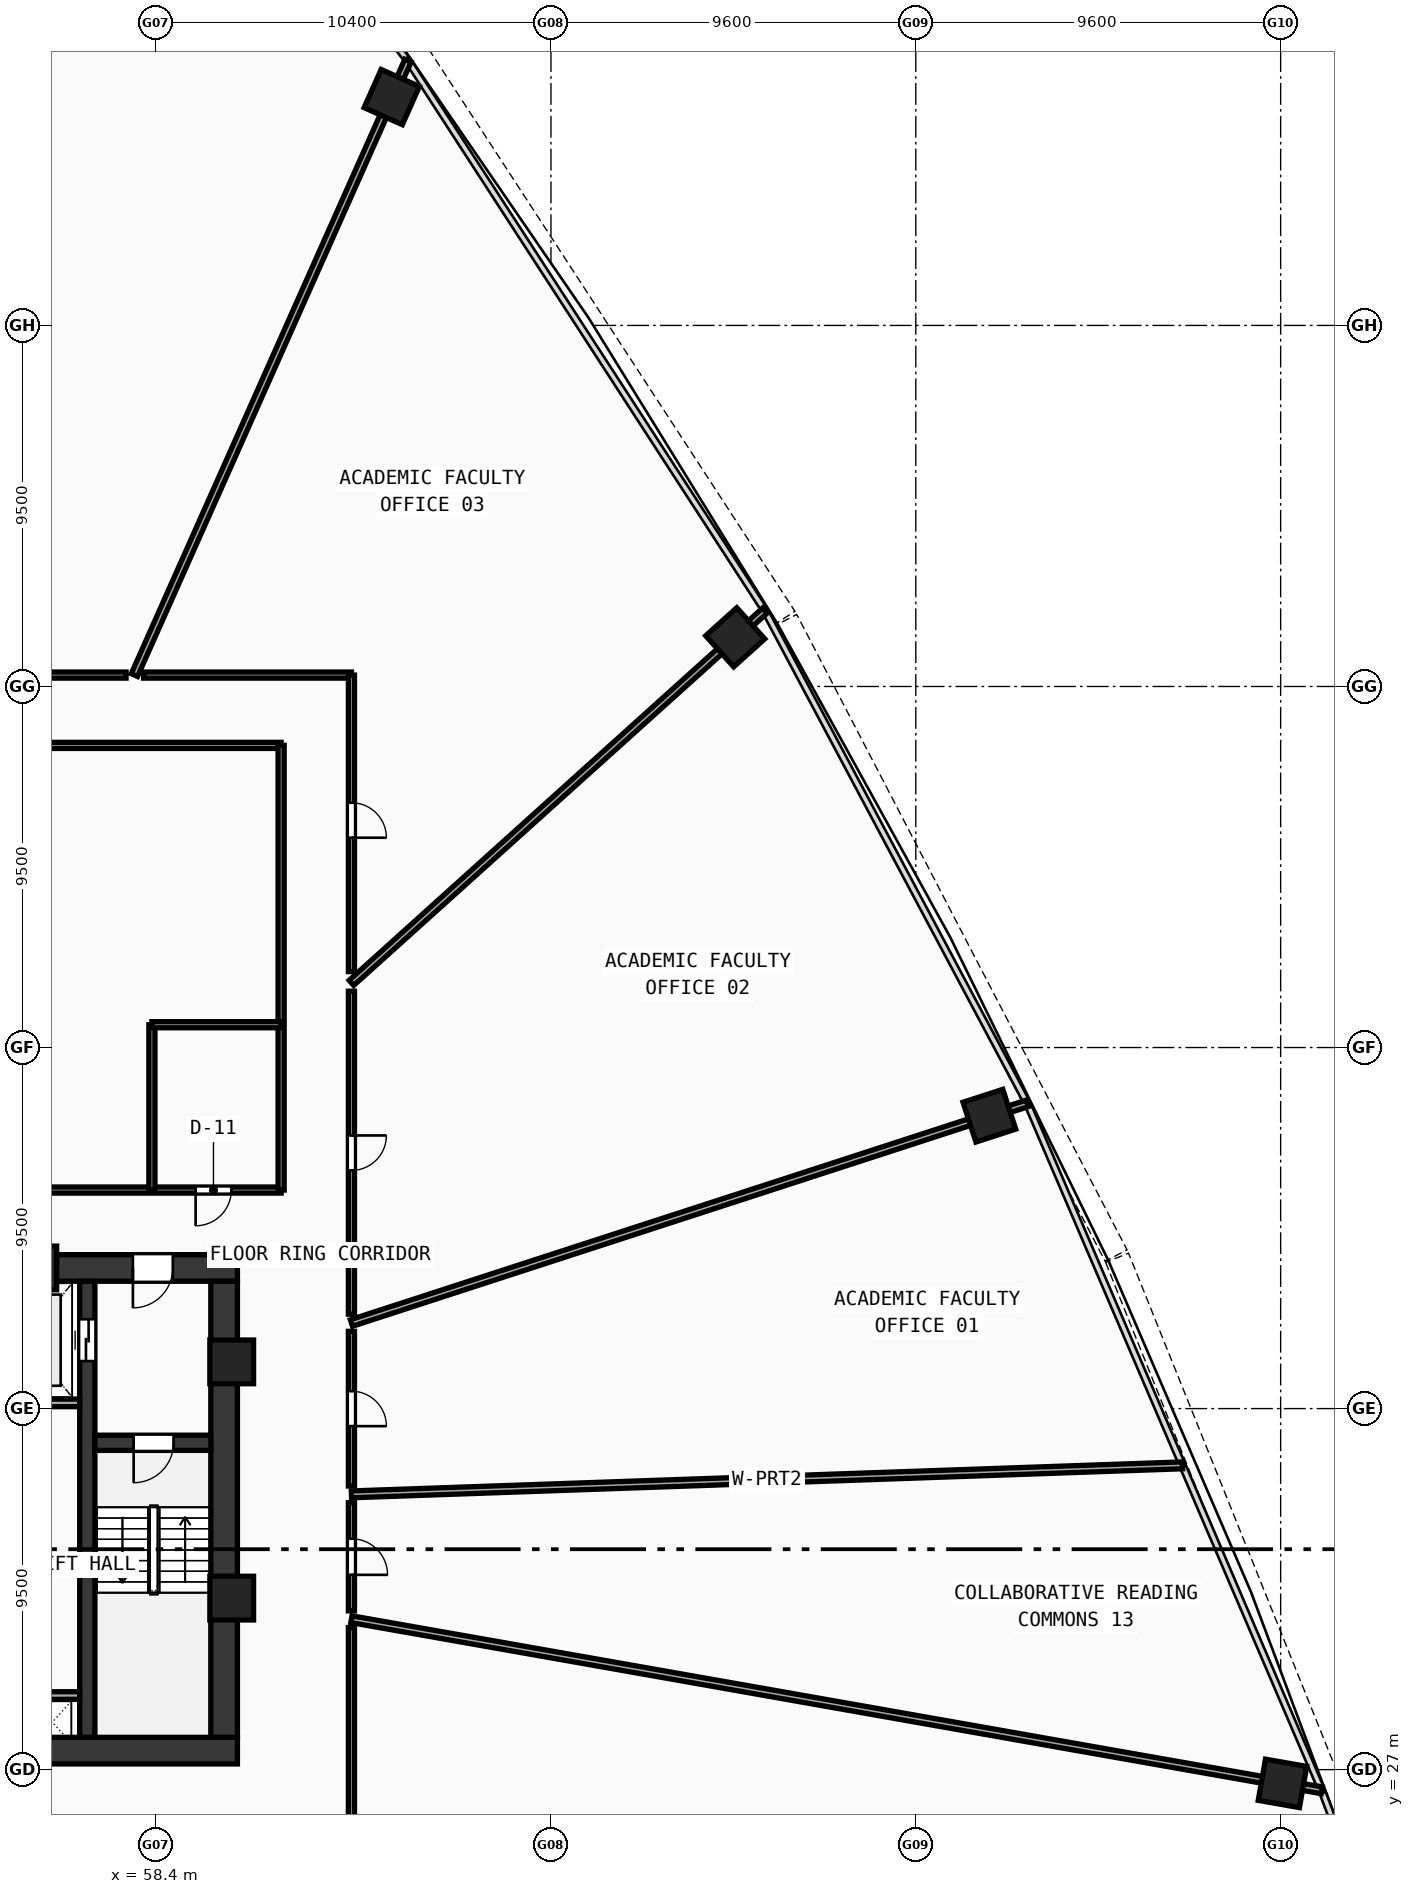
"""IFC4 building model, lengths in metres.
Left out: names, types, materials, properties, quantities, classifications, styles, units other than length and angle.
Written with IfcOpenShell. Run it as: python <this file> out.ifc"""

import sys

from ifc_helpers import new_model, si_unit, direction, frame, frame_2d, origin, origin_with_axes, origin_2d, place, context, subcontext, project, spatial, rectangle, hollow_rectangle, extrude, source, transform, mapped, element, fill, save


model = new_model("IFC4")
c1 = context("Model", 3, precision=1e-05, world=origin(), true_north=direction((0.0, 1.0)))
c2 = subcontext(c1, "Body", "Model", "MODEL_VIEW")
j1 = project(units=[si_unit("LENGTHUNIT", "METRE"), si_unit("PLANEANGLEUNIT", "RADIAN")], contexts=[c1])
p1 = place(None, origin())
s1 = spatial("IfcSite", under=j1, at=p1, CompositionType="ELEMENT")
p2 = place(p1, origin())
s2 = spatial("IfcBuilding", under=s1, at=p2, CompositionType="ELEMENT")
p3 = place(p2, frame((0.0, 0.0, 70.33)))
s3 = spatial("IfcBuildingStorey", under=s2, at=p3, CompositionType="ELEMENT", Elevation=70.33)
p4 = place(p3, frame((35.45, 27.5, 0.0), z_axis=(0.0, 0.0, 1.0), x_axis=(1.0, 0.0, 0.0)))
e1 = element("IfcWall", 1, at=p4, inside=s3, PredefinedType="SHEAR", context=c2, shape_type="SweptSolid", body=[
    extrude(rectangle(XDim=25.1, YDim=0.7, at=frame_2d((12.55, 0.0))), origin(), (0.0, 0.0, 1.0), 5.77),
])
p5 = place(p3, frame((49.2, 40.2, 0.0), z_axis=(0.0, 0.0, 1.0), x_axis=(1.0, 0.0, 0.0)))
e2 = element("IfcWall", 2, at=p5, inside=s3, PredefinedType="SHEAR", context=c2, shape_type="SweptSolid", body=[
    extrude(rectangle(XDim=11.35, YDim=0.7, at=frame_2d((5.675, 0.0))), origin(), (0.0, 0.0, 1.0), 5.77),
])
p6 = place(p5, frame((8.6, 0.0, 0.0)))
e3 = element("IfcOpeningElement", 3, at=p6, cuts=e2, PredefinedType="OPENING", context=c2, shape_type="SweptSolid", body=[
    extrude(rectangle(XDim=1.05, YDim=2.1, at=frame_2d((0.525, 1.05))), frame((0.0, 0.36, 0.0), z_axis=(0.0, -1.0, 0.0), x_axis=(1.0, 0.0, 0.0)), (0.0, 0.0, 1.0), 0.72),
])
p7 = place(p3, frame((60.2, 27.85, 0.0), z_axis=(0.0, 0.0, 1.0), x_axis=(0.0, 1.0, 0.0)))
e4 = element("IfcWall", 4, at=p7, inside=s3, PredefinedType="SHEAR", context=c2, shape_type="SweptSolid", body=[
    extrude(rectangle(XDim=12.0, YDim=0.7, at=frame_2d((6.0, 0.0))), origin(), (0.0, 0.0, 1.0), 5.77),
])
p8 = place(p3, frame((56.6, 27.85, 0.0), z_axis=(0.0, 0.0, 1.0), x_axis=(0.0, 1.0, 0.0)))
e5 = element("IfcWall", 5, at=p8, inside=s3, PredefinedType="SHEAR", context=c2, shape_type="SweptSolid", body=[
    extrude(rectangle(XDim=12.0, YDim=0.4, at=frame_2d((6.0, 0.0))), origin(), (0.0, 0.0, 1.0), 5.77),
])
p9 = place(p8, frame((9.9, 0.0, 0.0)))
e6 = element("IfcOpeningElement", 6, at=p9, cuts=e5, PredefinedType="OPENING", context=c2, shape_type="SweptSolid", body=[
    extrude(rectangle(XDim=1.1, YDim=2.1, at=frame_2d((0.55, 1.05))), frame((0.0, 0.21, 0.0), z_axis=(0.0, -1.0, 0.0), x_axis=(1.0, 0.0, 0.0)), (0.0, 0.0, 1.0), 0.42),
])
p10 = place(p3, frame((56.8, 35.6, 0.0), z_axis=(0.0, 0.0, 1.0), x_axis=(1.0, 0.0, 0.0)))
e7 = element("IfcWall", 7, at=p10, inside=s3, PredefinedType="SHEAR", context=c2, shape_type="SweptSolid", body=[
    extrude(rectangle(XDim=3.05, YDim=0.4, at=frame_2d((1.525, 0.0))), origin(), (0.0, 0.0, 1.0), 5.77),
])
p11 = place(p10, frame((1.02, 0.0, 0.0)))
e8 = element("IfcOpeningElement", 8, at=p11, cuts=e7, PredefinedType="OPENING", context=c2, shape_type="SweptSolid", body=[
    extrude(rectangle(XDim=1.05, YDim=2.1, at=frame_2d((0.525, 1.05))), frame((0.0, 0.21, 0.0), z_axis=(0.0, -1.0, 0.0), x_axis=(1.0, 0.0, 0.0)), (0.0, 0.0, 1.0), 0.42),
])
m1 = source(origin(), c2, "Body", "SweptSolid", [
    extrude(hollow_rectangle(XDim=1.15, YDim=1.15, WallThickness=0.048, at=origin_2d()), origin(), (0.0, 0.0, 1.0), 6.03),
])
for number, where, z_axis, x_axis in (
    (9, (60.4, 31.513, -0.26), (0.0, 0.0, 1.0), (1.0, 0.0, 0.0)),
    (10, (60.4, 37.729, -0.26), (0.0, 0.0, 1.0), (1.0, 0.0, 0.0)),
    (11, (55.219, 40.2, -0.26), (0.0, 0.0, 1.0), (1.0, 0.0, 0.0)),
):
    element("IfcColumn", number, at=place(p3, frame(where, z_axis=z_axis, x_axis=x_axis)), inside=s3, PredefinedType="COLUMN", context=c2, shape_type="MappedRepresentation", body=[
        mapped(m1, transform((0.0, 0.0, 0.0), scale=1.0)),
    ])
m2 = source(origin(), c2, "Body", "SweptSolid", [
    extrude(hollow_rectangle(XDim=1.1, YDim=1.1, WallThickness=0.045, at=origin_2d()), origin(), (0.0, 0.0, 1.0), 6.03),
])
for number, where, z_axis, x_axis in (
    (12, (88.048, 26.638, -0.26), (0.0, 0.0, 1.0), (0.174, 0.985, 0.0)),
    (13, (80.335, 44.206, -0.26), (0.0, 0.0, 1.0), (-0.309, 0.951, 0.0)),
    (14, (73.649, 56.794, -0.26), (0.0, 0.0, 1.0), (-0.669, 0.743, 0.0)),
    (15, (64.611, 71.009, -0.26), (0.0, 0.0, 1.0), (-0.914, 0.407, 0.0)),
):
    element("IfcColumn", number, at=place(p3, frame(where, z_axis=z_axis, x_axis=x_axis)), inside=s3, PredefinedType="COLUMN", context=c2, shape_type="MappedRepresentation", body=[
        mapped(m2, transform((0.0, 0.0, 0.0), scale=1.0)),
    ])
p12 = place(p3, frame((53.68, 36.65, 0.0), z_axis=(0.0, 0.0, 1.0), x_axis=(1.0, 0.0, 0.0)))
e16 = element("IfcWall", 16, at=p12, inside=s3, PredefinedType="SOLIDWALL", context=c2, shape_type="SweptSolid", body=[
    extrude(rectangle(XDim=2.72, YDim=0.2, at=frame_2d((1.36, 0.0))), origin(), (0.0, 0.0, 1.0), 5.77),
])
p13 = place(p3, frame((55.12, 28.95, 0.0), z_axis=(0.0, 0.0, 1.0), x_axis=(1.0, 0.0, 0.0)))
e17 = element("IfcWall", 17, at=p13, inside=s3, PredefinedType="SOLIDWALL", context=c2, shape_type="SweptSolid", body=[
    extrude(rectangle(XDim=1.28, YDim=0.2, at=frame_2d((0.64, 0.0))), origin(), (0.0, 0.0, 1.0), 5.77),
])
p14 = place(p3, frame((45.92, 42.25, 0.0), z_axis=(0.0, 0.0, 1.0), x_axis=(1.0, 0.0, 0.0)))
e18 = element("IfcWall", 18, at=p14, inside=s3, PredefinedType="PARTITIONING", context=c2, shape_type="SweptSolid", body=[
    extrude(rectangle(XDim=15.78, YDim=0.16, at=frame_2d((7.89, 0.0))), origin(), (0.0, 0.0, 1.0), 2.42),
])
p15 = place(p14, frame((2.1, 0.0, 0.0)))
e19 = element("IfcOpeningElement", 19, at=p15, cuts=e18, PredefinedType="OPENING", context=c2, shape_type="SweptSolid", body=[
    extrude(rectangle(XDim=0.92, YDim=2.1, at=frame_2d((0.46, 1.05))), frame((0.0, 0.09, 0.0), z_axis=(0.0, -1.0, 0.0), x_axis=(1.0, 0.0, 0.0)), (0.0, 0.0, 1.0), 0.18),
])
p16 = place(p14, frame((13.53, 0.0, 0.0)))
e20 = element("IfcOpeningElement", 20, at=p16, cuts=e18, PredefinedType="OPENING", context=c2, shape_type="SweptSolid", body=[
    extrude(rectangle(XDim=0.94, YDim=2.1, at=frame_2d((0.47, 1.05))), frame((0.0, 0.09, 0.0), z_axis=(0.0, -1.0, 0.0), x_axis=(1.0, 0.0, 0.0)), (0.0, 0.0, 1.0), 0.18),
])
p17 = place(p3, frame((45.92, 53.95, 0.0), z_axis=(0.0, 0.0, 1.0), x_axis=(1.0, 0.0, 0.0)))
e21 = element("IfcWall", 21, at=p17, inside=s3, PredefinedType="PARTITIONING", context=c2, shape_type="SweptSolid", body=[
    extrude(rectangle(XDim=15.78, YDim=0.16, at=frame_2d((7.89, 0.0))), origin(), (0.0, 0.0, 1.0), 2.42),
])
p18 = place(p3, frame((61.7, 42.25, 0.0), z_axis=(0.0, 0.0, 1.0), x_axis=(0.0, 1.0, 0.0)))
e22 = element("IfcWall", 22, at=p18, inside=s3, PredefinedType="PARTITIONING", context=c2, shape_type="SweptSolid", body=[
    extrude(rectangle(XDim=11.7, YDim=0.16, at=frame_2d((5.85, 0.0))), origin(), (0.0, 0.0, 1.0), 2.42),
])
p19 = place(p3, frame((58.3, 42.25, 0.0), z_axis=(0.0, 0.0, 1.0), x_axis=(0.0, 1.0, 0.0)))
e23 = element("IfcWall", 23, at=p19, inside=s3, PredefinedType="PARTITIONING", context=c2, shape_type="SweptSolid", body=[
    extrude(rectangle(XDim=4.35, YDim=0.16, at=frame_2d((2.175, 0.0))), origin(), (0.0, 0.0, 1.0), 2.42),
])
p20 = place(p3, frame((58.3, 46.6, 0.0), z_axis=(0.0, 0.0, 1.0), x_axis=(1.0, 0.0, 0.0)))
e24 = element("IfcWall", 24, at=p20, inside=s3, PredefinedType="PARTITIONING", context=c2, shape_type="SweptSolid", body=[
    extrude(rectangle(XDim=3.4, YDim=0.16, at=frame_2d((1.7, 0.0))), origin(), (0.0, 0.0, 1.0), 2.42),
])
p21 = place(p3, frame((63.55, 34.243, 0.0), z_axis=(0.0, 0.0, 1.0), x_axis=(0.999390701976, 0.034903077271, 0.0)))
e25 = element("IfcWall", 25, at=p21, inside=s3, PredefinedType="PARTITIONING", context=c2, shape_type="SweptSolid", body=[
    extrude(rectangle(XDim=21.88, YDim=0.18, at=frame_2d((10.94, 0.0))), origin(), (0.0, 0.0, 1.0), 5.07),
])
p22 = place(p3, frame((63.55, 38.752, 0.0), z_axis=(0.0, 0.0, 1.0), x_axis=(0.951053160417, 0.309027322514, 0.0)))
e26 = element("IfcWall", 26, at=p22, inside=s3, PredefinedType="PARTITIONING", context=c2, shape_type="SweptSolid", body=[
    extrude(rectangle(XDim=18.699, YDim=0.18, at=frame_2d((9.35, 0.0))), origin(), (0.0, 0.0, 1.0), 2.42),
])
p23 = place(p3, frame((63.55, 47.701, 0.0), z_axis=(0.0, 0.0, 1.0), x_axis=(0.743144860423, 0.669130567547, 0.0)))
e27 = element("IfcWall", 27, at=p23, inside=s3, PredefinedType="PARTITIONING", context=c2, shape_type="SweptSolid", body=[
    extrude(rectangle(XDim=14.639, YDim=0.18, at=frame_2d((7.319, 0.0))), origin(), (0.0, 0.0, 1.0), 2.42),
])
p24 = place(p3, frame((57.84, 55.8, 0.0), z_axis=(0.0, 0.0, 1.0), x_axis=(0.406732277088, 0.913547401493, 0.0)))
e28 = element("IfcWall", 28, at=p24, inside=s3, PredefinedType="PARTITIONING", context=c2, shape_type="SweptSolid", body=[
    extrude(rectangle(XDim=17.698, YDim=0.18, at=frame_2d((8.849, 0.0))), origin(), (0.0, 0.0, 1.0), 2.42),
])
p25 = place(p3, frame((63.55, 30.958, 0.0), z_axis=(0.0, 0.0, 1.0), x_axis=(0.984809239356, -0.173639747982, 0.0)))
e29 = element("IfcWall", 29, at=p25, inside=s3, PredefinedType="PARTITIONING", context=c2, shape_type="SweptSolid", body=[
    extrude(rectangle(XDim=25.926, YDim=0.18, at=frame_2d((12.963, 0.0))), origin(), (0.0, 0.0, 1.0), 2.42),
])
p26 = place(p3, frame((52.391, 55.8, 0.0), z_axis=(0.0, 0.0, 1.0), x_axis=(1.0, 0.0, 0.0)))
e30 = element("IfcWall", 30, at=p26, inside=s3, PredefinedType="PARTITIONING", context=c2, shape_type="SweptSolid", body=[
    extrude(rectangle(XDim=5.229, YDim=0.16, at=frame_2d((2.614, 0.0))), origin(), (0.0, 0.0, 1.0), 2.42),
])
p27 = place(p3, frame((58.08, 55.8, 0.0), z_axis=(0.0, 0.0, 1.0), x_axis=(1.0, 0.0, 0.0)))
e31 = element("IfcWall", 31, at=p27, inside=s3, PredefinedType="PARTITIONING", context=c2, shape_type="SweptSolid", body=[
    extrude(rectangle(XDim=5.47, YDim=0.16, at=frame_2d((2.735, 0.0))), origin(), (0.0, 0.0, 1.0), 2.42),
])
p28 = place(p3, frame((63.55, 55.8, 0.0), z_axis=(0.0, 0.0, 1.0), x_axis=(0.0, -1.0, 0.0)))
e32 = element("IfcWall", 32, at=p28, inside=s3, PredefinedType="PARTITIONING", context=c2, shape_type="SweptSolid", body=[
    extrude(rectangle(XDim=7.803, YDim=0.16, at=frame_2d((3.901, 0.0))), origin(), (0.0, 0.0, 1.0), 2.42),
])
p29 = place(p28, frame((3.359, 0.0, 0.0)))
e33 = element("IfcOpeningElement", 33, at=p29, cuts=e32, PredefinedType="OPENING", context=c2, shape_type="SweptSolid", body=[
    extrude(rectangle(XDim=0.92, YDim=2.1, at=frame_2d((0.46, 1.05))), frame((0.0, 0.09, 0.0), z_axis=(0.0, -1.0, 0.0), x_axis=(1.0, 0.0, 0.0)), (0.0, 0.0, 1.0), 0.18),
])
p30 = place(p3, frame((63.55, 47.482, 0.0), z_axis=(0.0, 0.0, 1.0), x_axis=(0.0, -1.0, 0.0)))
e34 = element("IfcWall", 34, at=p30, inside=s3, PredefinedType="PARTITIONING", context=c2, shape_type="SweptSolid", body=[
    extrude(rectangle(XDim=8.498, YDim=0.16, at=frame_2d((4.249, 0.0))), origin(), (0.0, 0.0, 1.0), 2.42),
])
p31 = place(p30, frame((3.795, 0.0, 0.0)))
e35 = element("IfcOpeningElement", 35, at=p31, cuts=e34, PredefinedType="OPENING", context=c2, shape_type="SweptSolid", body=[
    extrude(rectangle(XDim=0.92, YDim=2.1, at=frame_2d((0.46, 1.05))), frame((0.0, 0.09, 0.0), z_axis=(0.0, -1.0, 0.0), x_axis=(1.0, 0.0, 0.0)), (0.0, 0.0, 1.0), 0.18),
])
p32 = place(p3, frame((63.55, 38.533, 0.0), z_axis=(0.0, 0.0, 1.0), x_axis=(0.0, -1.0, 0.0)))
e36 = element("IfcWall", 36, at=p32, inside=s3, PredefinedType="PARTITIONING", context=c2, shape_type="SweptSolid", body=[
    extrude(rectangle(XDim=4.07, YDim=0.16, at=frame_2d((2.035, 0.0))), origin(), (0.0, 0.0, 1.0), 2.42),
])
p33 = place(p32, frame((1.575, 0.0, 0.0)))
e37 = element("IfcOpeningElement", 37, at=p33, cuts=e36, PredefinedType="OPENING", context=c2, shape_type="SweptSolid", body=[
    extrude(rectangle(XDim=0.92, YDim=2.1, at=frame_2d((0.46, 1.05))), frame((0.0, 0.09, 0.0), z_axis=(0.0, -1.0, 0.0), x_axis=(1.0, 0.0, 0.0)), (0.0, 0.0, 1.0), 0.18),
])
p34 = place(p3, frame((63.55, 34.023, 0.0), z_axis=(0.0, 0.0, 1.0), x_axis=(0.0, -1.0, 0.0)))
e38 = element("IfcWall", 38, at=p34, inside=s3, PredefinedType="PARTITIONING", context=c2, shape_type="SweptSolid", body=[
    extrude(rectangle(XDim=2.845, YDim=0.16, at=frame_2d((1.423, 0.0))), origin(), (0.0, 0.0, 1.0), 2.42),
])
p35 = place(p34, frame((0.948, 0.0, 0.0)))
e39 = element("IfcOpeningElement", 39, at=p35, cuts=e38, PredefinedType="OPENING", context=c2, shape_type="SweptSolid", body=[
    extrude(rectangle(XDim=0.95, YDim=2.1, at=frame_2d((0.475, 1.05))), frame((0.0, 0.09, 0.0), z_axis=(0.0, -1.0, 0.0), x_axis=(1.0, 0.0, 0.0)), (0.0, 0.0, 1.0), 0.18),
])
p36 = place(p3, frame((63.55, 30.735, 0.0), z_axis=(0.0, 0.0, 1.0), x_axis=(0.0, -1.0, 0.0)))
e40 = element("IfcWall", 40, at=p36, inside=s3, PredefinedType="PARTITIONING", context=c2, shape_type="SweptSolid", body=[
    extrude(rectangle(XDim=5.935, YDim=0.16, at=frame_2d((2.967, 0.0))), origin(), (0.0, 0.0, 1.0), 2.42),
])
m3 = source(origin(), c2, "Body", "SweptSolid", [
    extrude(rectangle(XDim=1.05, YDim=2.1, at=frame_2d((0.525, 1.05))), frame((0.0, 0.025, 0.0), z_axis=(0.0, -1.0, 0.0), x_axis=(1.0, 0.0, 0.0)), (0.0, 0.0, 1.0), 0.05),
])
p37 = place(p11, frame((1.05, 0.0, 0.0), z_axis=(0.0, 0.0, 1.0), x_axis=(-1.0, 0.0, 0.0)))
e41 = element("IfcDoor", 41, at=p37, inside=s3, OperationType="SINGLE_SWING_RIGHT", PredefinedType="DOOR", context=c2, shape_type="MappedRepresentation", body=[
    mapped(m3, transform((0.0, 0.0, 0.0), scale=1.0)),
])
fill(e8, e41)
p38 = place(p6, frame((1.05, 0.0, 0.0), z_axis=(0.0, 0.0, 1.0), x_axis=(-1.0, 0.0, 0.0)))
e42 = element("IfcDoor", 42, at=p38, inside=s3, OperationType="SINGLE_SWING_RIGHT", PredefinedType="DOOR", context=c2, shape_type="MappedRepresentation", body=[
    mapped(m3, transform((0.0, 0.0, 0.0), scale=1.0)),
])
fill(e3, e42)
m4 = source(origin(), c2, "Body", "SweptSolid", [
    extrude(rectangle(XDim=1.1, YDim=2.1, at=frame_2d((0.55, 1.05))), frame((0.0, 0.025, 0.0), z_axis=(0.0, -1.0, 0.0), x_axis=(1.0, 0.0, 0.0)), (0.0, 0.0, 1.0), 0.05),
])
p39 = place(p9, origin_with_axes())
e43 = element("IfcDoor", 43, at=p39, inside=s3, OperationType="DOUBLE_DOOR_SLIDING", PredefinedType="DOOR", context=c2, shape_type="MappedRepresentation", body=[
    mapped(m4, transform((0.0, 0.0, 0.0), scale=1.0)),
])
fill(e6, e43)
m5 = source(origin(), c2, "Body", "SweptSolid", [
    extrude(rectangle(XDim=0.94, YDim=2.1, at=frame_2d((0.47, 1.05))), frame((0.0, 0.025, 0.0), z_axis=(0.0, -1.0, 0.0), x_axis=(1.0, 0.0, 0.0)), (0.0, 0.0, 1.0), 0.05),
])
p40 = place(p16, frame((0.94, 0.0, 0.0), z_axis=(0.0, 0.0, 1.0), x_axis=(-1.0, 0.0, 0.0)))
e44 = element("IfcDoor", 44, at=p40, inside=s3, OperationType="SINGLE_SWING_RIGHT", PredefinedType="DOOR", context=c2, shape_type="MappedRepresentation", body=[
    mapped(m5, transform((0.0, 0.0, 0.0), scale=1.0)),
])
fill(e20, e44)
m6 = source(origin(), c2, "Body", "SweptSolid", [
    extrude(rectangle(XDim=0.92, YDim=2.1, at=frame_2d((0.46, 1.05))), frame((0.0, 0.025, 0.0), z_axis=(0.0, -1.0, 0.0), x_axis=(1.0, 0.0, 0.0)), (0.0, 0.0, 1.0), 0.05),
])
p41 = place(p33, origin_with_axes())
e45 = element("IfcDoor", 45, at=p41, inside=s3, OperationType="SINGLE_SWING_RIGHT", PredefinedType="DOOR", context=c2, shape_type="MappedRepresentation", body=[
    mapped(m6, transform((0.0, 0.0, 0.0), scale=1.0)),
])
fill(e37, e45)
p42 = place(p31, origin_with_axes())
e46 = element("IfcDoor", 46, at=p42, inside=s3, OperationType="SINGLE_SWING_LEFT", PredefinedType="DOOR", context=c2, shape_type="MappedRepresentation", body=[
    mapped(m6, transform((0.0, 0.0, 0.0), scale=1.0)),
])
fill(e35, e46)
p43 = place(p29, origin_with_axes())
e47 = element("IfcDoor", 47, at=p43, inside=s3, OperationType="SINGLE_SWING_RIGHT", PredefinedType="DOOR", context=c2, shape_type="MappedRepresentation", body=[
    mapped(m6, transform((0.0, 0.0, 0.0), scale=1.0)),
])
fill(e33, e47)
m7 = source(origin(), c2, "Body", "SweptSolid", [
    extrude(rectangle(XDim=0.95, YDim=2.1, at=frame_2d((0.475, 1.05))), frame((0.0, 0.025, 0.0), z_axis=(0.0, -1.0, 0.0), x_axis=(1.0, 0.0, 0.0)), (0.0, 0.0, 1.0), 0.05),
])
p44 = place(p35, origin_with_axes())
e48 = element("IfcDoor", 48, at=p44, inside=s3, OperationType="SINGLE_SWING_RIGHT", PredefinedType="DOOR", context=c2, shape_type="MappedRepresentation", body=[
    mapped(m7, transform((0.0, 0.0, 0.0), scale=1.0)),
])
fill(e39, e48)
save(model, sys.argv[1])
